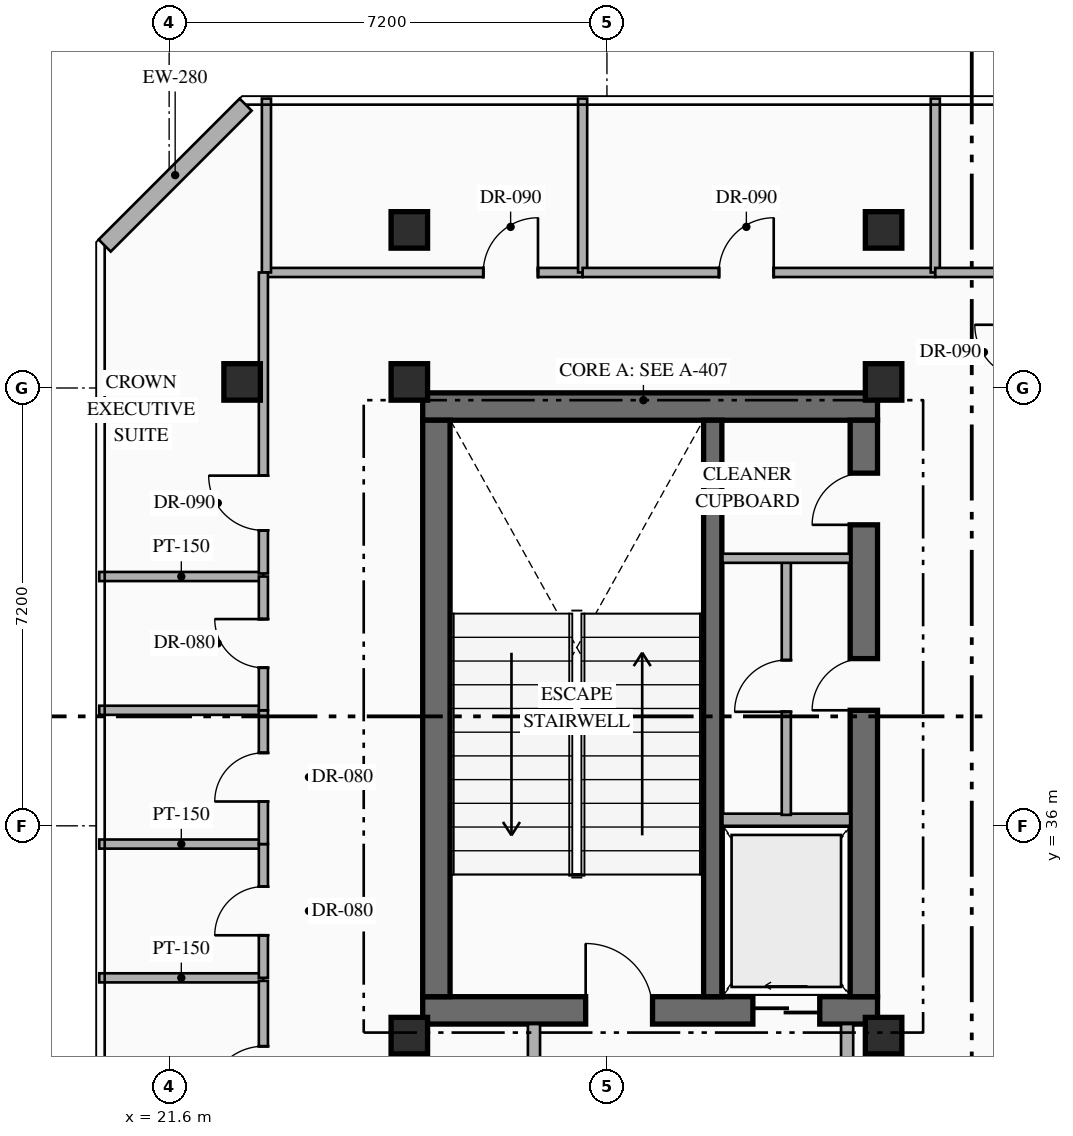
"""IFC4 building model, lengths in metres.
Left out: names, types, materials, properties, quantities, classifications, styles, units other than length and angle.
Written with IfcOpenShell. Run it as: python <this file> out.ifc"""

import sys

from ifc_helpers import new_model, si_unit, direction, frame, frame_2d, origin, origin_2d, place, context, subcontext, project, spatial, rectangle, hollow_rectangle, extrude, element, fill, save


model = new_model("IFC4")
c1 = context("Model", 3, precision=1e-05, world=origin(), true_north=direction((0.0, 1.0)))
c2 = subcontext(c1, "Body", "Model", "MODEL_VIEW")
j1 = project(units=[si_unit("LENGTHUNIT", "METRE"), si_unit("PLANEANGLEUNIT", "RADIAN")], contexts=[c1])
p1 = place(None, origin())
s1 = spatial("IfcSite", under=j1, at=p1, CompositionType="ELEMENT")
p2 = place(p1, origin())
s2 = spatial("IfcBuilding", under=s1, at=p2, CompositionType="ELEMENT")
p3 = place(p2, frame((0.0, 0.0, 277.95)))
s3 = spatial("IfcBuildingStorey", under=s2, at=p3, CompositionType="ELEMENT", Elevation=277.95)
p4 = place(p3, frame((25.77, 32.965, 0.0), z_axis=(0.0, 0.0, 1.0), x_axis=(1.0, 0.0, 0.0)))
e1 = element("IfcWall", 1, at=p4, inside=s3, PredefinedType="SHEAR", context=c2, shape_type="SweptSolid", body=[
    extrude(rectangle(XDim=7.48, YDim=0.45, at=frame_2d((3.74, 0.0))), origin(), (0.0, 0.0, 1.0), 4.0),
])
p5 = place(p4, frame((2.68, 0.0, 0.0)))
e2 = element("IfcOpeningElement", 2, at=p5, cuts=e1, PredefinedType="OPENING", context=c2, shape_type="SweptSolid", body=[
    extrude(rectangle(XDim=1.1, YDim=2.2, at=frame_2d((0.55, 1.1))), frame((0.0, 0.235, 0.0), z_axis=(0.0, -1.0, 0.0), x_axis=(1.0, 0.0, 0.0)), (0.0, 0.0, 1.0), 0.47),
])
p6 = place(p4, frame((5.43, 0.0, 0.0)))
e3 = element("IfcOpeningElement", 3, at=p6, cuts=e1, PredefinedType="OPENING", context=c2, shape_type="SweptSolid", body=[
    extrude(rectangle(XDim=1.1, YDim=2.15, at=frame_2d((0.55, 1.075))), frame((0.0, 0.235, 0.0), z_axis=(0.0, -1.0, 0.0), x_axis=(1.0, 0.0, 0.0)), (0.0, 0.0, 1.0), 0.47),
])
p7 = place(p3, frame((25.77, 42.895, 0.0), z_axis=(0.0, 0.0, 1.0), x_axis=(1.0, 0.0, 0.0)))
e4 = element("IfcWall", 4, at=p7, inside=s3, PredefinedType="SHEAR", context=c2, shape_type="SweptSolid", body=[
    extrude(rectangle(XDim=7.48, YDim=0.45, at=frame_2d((3.74, 0.0))), origin(), (0.0, 0.0, 1.0), 4.0),
])
p8 = place(p3, frame((25.995, 33.19, 0.0), z_axis=(0.0, 0.0, 1.0), x_axis=(0.0, 1.0, 0.0)))
e5 = element("IfcWall", 5, at=p8, inside=s3, PredefinedType="SHEAR", context=c2, shape_type="SweptSolid", body=[
    extrude(rectangle(XDim=9.48, YDim=0.45, at=frame_2d((4.74, 0.0))), origin(), (0.0, 0.0, 1.0), 4.0),
])
p9 = place(p3, frame((33.025, 33.19, 0.0), z_axis=(0.0, 0.0, 1.0), x_axis=(0.0, 1.0, 0.0)))
e6 = element("IfcWall", 6, at=p9, inside=s3, PredefinedType="SHEAR", context=c2, shape_type="SweptSolid", body=[
    extrude(rectangle(XDim=9.48, YDim=0.45, at=frame_2d((4.74, 0.0))), origin(), (0.0, 0.0, 1.0), 4.0),
])
p10 = place(p9, frame((4.71, 0.0, 0.0)))
e7 = element("IfcOpeningElement", 7, at=p10, cuts=e6, PredefinedType="OPENING", context=c2, shape_type="SweptSolid", body=[
    extrude(rectangle(XDim=0.85, YDim=2.08, at=frame_2d((0.425, 1.04))), frame((0.0, 0.235, 0.0), z_axis=(0.0, -1.0, 0.0), x_axis=(1.0, 0.0, 0.0)), (0.0, 0.0, 1.0), 0.47),
])
p11 = place(p9, frame((7.76, 0.0, 0.0)))
e8 = element("IfcOpeningElement", 8, at=p11, cuts=e6, PredefinedType="OPENING", context=c2, shape_type="SweptSolid", body=[
    extrude(rectangle(XDim=0.85, YDim=2.08, at=frame_2d((0.425, 1.04))), frame((0.0, 0.235, 0.0), z_axis=(0.0, -1.0, 0.0), x_axis=(1.0, 0.0, 0.0)), (0.0, 0.0, 1.0), 0.47),
])
p12 = place(p3, frame((30.54, 33.19, 0.0), z_axis=(0.0, 0.0, 1.0), x_axis=(0.0, 1.0, 0.0)))
e9 = element("IfcWall", 9, at=p12, inside=s3, PredefinedType="SHEAR", context=c2, shape_type="SweptSolid", body=[
    extrude(rectangle(XDim=9.48, YDim=0.3, at=frame_2d((4.74, 0.0))), origin(), (0.0, 0.0, 1.0), 4.0),
])
for number, where, z_axis, x_axis in (
    (10, (25.55, 32.55, 0.0), (0.0, 0.0, 1.0), (1.0, 0.0, 0.0)),
    (11, (33.35, 32.55, 0.0), (0.0, 0.0, 1.0), (1.0, 0.0, 0.0)),
    (12, (25.55, 43.3, 0.0), (0.0, 0.0, 1.0), (1.0, 0.0, 0.0)),
    (13, (33.35, 43.3, 0.0), (0.0, 0.0, 1.0), (1.0, 0.0, 0.0)),
    (14, (25.55, 45.8, 0.0), (0.0, 0.0, 1.0), (1.0, 0.0, 0.0)),
    (15, (33.35, 45.8, 0.0), (0.0, 0.0, 1.0), (1.0, 0.0, 0.0)),
    (16, (22.8, 43.3, 0.0), (0.0, 0.0, 1.0), (1.0, 0.0, 0.0)),
):
    element("IfcColumn", number, at=place(p3, frame(where, z_axis=z_axis, x_axis=x_axis)), inside=s3, PredefinedType="COLUMN", context=c2, shape_type="SweptSolid", body=[
        extrude(hollow_rectangle(XDim=0.6, YDim=0.6, WallThickness=0.025, at=origin_2d()), origin(), (0.0, 0.0, 1.0), 4.0),
    ])
p13 = place(p3, frame((20.54, 45.542, 0.0), z_axis=(0.0, 0.0, 1.0), x_axis=(0.707069542501, 0.707144017911, 0.0)))
e17 = element("IfcWall", 17, at=p13, inside=s3, PredefinedType="STANDARD", context=c2, shape_type="SweptSolid", body=[
    extrude(rectangle(XDim=3.278, YDim=0.28, at=frame_2d((1.639, 0.0))), origin(), (0.0, 0.0, 1.0), 3.74),
])
p14 = place(p3, frame((30.7, 36.1, 0.0), z_axis=(0.0, 0.0, 1.0), x_axis=(1.0, 0.0, 0.0)))
e18 = element("IfcWall", 18, at=p14, inside=s3, PredefinedType="STANDARD", context=c2, shape_type="SweptSolid", body=[
    extrude(rectangle(XDim=2.1, YDim=0.2, at=frame_2d((1.05, 0.0))), origin(), (0.0, 0.0, 1.0), 3.74),
])
p15 = place(p3, frame((31.75, 36.18, 0.0), z_axis=(0.0, 0.0, 1.0), x_axis=(0.0, 1.0, 0.0)))
e19 = element("IfcWall", 19, at=p15, inside=s3, PredefinedType="PARTITIONING", context=c2, shape_type="SweptSolid", body=[
    extrude(rectangle(XDim=4.24, YDim=0.15, at=frame_2d((2.12, 0.0))), origin(), (0.0, 0.0, 1.0), 3.74),
])
p16 = place(p15, frame((1.695, 0.0, 0.0)))
e20 = element("IfcOpeningElement", 20, at=p16, cuts=e19, PredefinedType="OPENING", context=c2, shape_type="SweptSolid", body=[
    extrude(rectangle(XDim=0.85, YDim=2.08, at=frame_2d((0.425, 1.04))), frame((0.0, 0.085, 0.0), z_axis=(0.0, -1.0, 0.0), x_axis=(1.0, 0.0, 0.0)), (0.0, 0.0, 1.0), 0.17),
])
p17 = place(p3, frame((30.7, 40.4, 0.0), z_axis=(0.0, 0.0, 1.0), x_axis=(1.0, 0.0, 0.0)))
e21 = element("IfcWall", 21, at=p17, inside=s3, PredefinedType="PARTITIONING", context=c2, shape_type="SweptSolid", body=[
    extrude(rectangle(XDim=2.1, YDim=0.15, at=frame_2d((1.05, 0.0))), origin(), (0.0, 0.0, 1.0), 3.74),
])
p18 = place(p3, frame((27.6, 29.2, 0.0), z_axis=(0.0, 0.0, 1.0), x_axis=(0.0, 1.0, 0.0)))
e22 = element("IfcWall", 22, at=p18, inside=s3, PredefinedType="STANDARD", context=c2, shape_type="SweptSolid", body=[
    extrude(rectangle(XDim=3.54, YDim=0.2, at=frame_2d((1.77, 0.0))), origin(), (0.0, 0.0, 1.0), 3.74),
])
p19 = place(p3, frame((32.75, 29.2, 0.0), z_axis=(0.0, 0.0, 1.0), x_axis=(0.0, 1.0, 0.0)))
e23 = element("IfcWall", 23, at=p19, inside=s3, PredefinedType="STANDARD", context=c2, shape_type="SweptSolid", body=[
    extrude(rectangle(XDim=3.54, YDim=0.2, at=frame_2d((1.77, 0.0))), origin(), (0.0, 0.0, 1.0), 3.74),
])
p20 = place(p19, frame((1.45, 0.0, 0.0)))
e24 = element("IfcOpeningElement", 24, at=p20, cuts=e23, PredefinedType="OPENING", context=c2, shape_type="SweptSolid", body=[
    extrude(rectangle(XDim=1.0, YDim=2.2, at=frame_2d((0.5, 1.1))), frame((0.0, 0.11, 0.0), z_axis=(0.0, -1.0, 0.0), x_axis=(1.0, 0.0, 0.0)), (0.0, 0.0, 1.0), 0.22),
])
for number, where, z_axis, x_axis in (
    (25, (20.45, 33.5, 0.0), (0.0, 0.0, 1.0), (1.0, 0.0, 0.0)),
    (26, (20.45, 40.1, 0.0), (0.0, 0.0, 1.0), (1.0, 0.0, 0.0)),
    (27, (20.45, 35.7, 0.0), (0.0, 0.0, 1.0), (1.0, 0.0, 0.0)),
    (28, (20.45, 37.9, 0.0), (0.0, 0.0, 1.0), (1.0, 0.0, 0.0)),
):
    element("IfcWall", number, at=place(p3, frame(where, z_axis=z_axis, x_axis=x_axis)), inside=s3, PredefinedType="PARTITIONING", context=c2, shape_type="SweptSolid", body=[
        extrude(rectangle(XDim=2.7, YDim=0.15, at=frame_2d((1.35, 0.0))), origin(), (0.0, 0.0, 1.0), 3.74),
    ])
p21 = place(p3, frame((23.15, 33.5, 0.0), z_axis=(0.0, 0.0, 1.0), x_axis=(0.0, 1.0, 0.0)))
e29 = element("IfcWall", 29, at=p21, inside=s3, PredefinedType="PARTITIONING", context=c2, shape_type="SweptSolid", body=[
    extrude(rectangle(XDim=2.2, YDim=0.15, at=frame_2d((1.1, 0.0))), origin(), (0.0, 0.0, 1.0), 3.74),
])
p22 = place(p21, frame((0.7, 0.0, 0.0)))
e30 = element("IfcOpeningElement", 30, at=p22, cuts=e29, PredefinedType="OPENING", context=c2, shape_type="SweptSolid", body=[
    extrude(rectangle(XDim=0.8, YDim=2.06, at=frame_2d((0.4, 1.03))), frame((0.0, 0.085, 0.0), z_axis=(0.0, -1.0, 0.0), x_axis=(1.0, 0.0, 0.0)), (0.0, 0.0, 1.0), 0.17),
])
p23 = place(p3, frame((23.15, 35.7, 0.0), z_axis=(0.0, 0.0, 1.0), x_axis=(0.0, 1.0, 0.0)))
e31 = element("IfcWall", 31, at=p23, inside=s3, PredefinedType="PARTITIONING", context=c2, shape_type="SweptSolid", body=[
    extrude(rectangle(XDim=2.2, YDim=0.15, at=frame_2d((1.1, 0.0))), origin(), (0.0, 0.0, 1.0), 3.74),
])
p24 = place(p23, frame((0.7, 0.0, 0.0)))
e32 = element("IfcOpeningElement", 32, at=p24, cuts=e31, PredefinedType="OPENING", context=c2, shape_type="SweptSolid", body=[
    extrude(rectangle(XDim=0.8, YDim=2.06, at=frame_2d((0.4, 1.03))), frame((0.0, 0.085, 0.0), z_axis=(0.0, -1.0, 0.0), x_axis=(1.0, 0.0, 0.0)), (0.0, 0.0, 1.0), 0.17),
])
p25 = place(p3, frame((23.15, 37.9, 0.0), z_axis=(0.0, 0.0, 1.0), x_axis=(0.0, 1.0, 0.0)))
e33 = element("IfcWall", 33, at=p25, inside=s3, PredefinedType="PARTITIONING", context=c2, shape_type="SweptSolid", body=[
    extrude(rectangle(XDim=2.2, YDim=0.15, at=frame_2d((1.1, 0.0))), origin(), (0.0, 0.0, 1.0), 3.74),
])
p26 = place(p25, frame((0.7, 0.0, 0.0)))
e34 = element("IfcOpeningElement", 34, at=p26, cuts=e33, PredefinedType="OPENING", context=c2, shape_type="SweptSolid", body=[
    extrude(rectangle(XDim=0.8, YDim=2.06, at=frame_2d((0.4, 1.03))), frame((0.0, 0.085, 0.0), z_axis=(0.0, -1.0, 0.0), x_axis=(1.0, 0.0, 0.0)), (0.0, 0.0, 1.0), 0.17),
])
p27 = place(p3, frame((23.2, 45.1, 0.0), z_axis=(0.0, 0.0, 1.0), x_axis=(1.0, 0.0, 0.0)))
e35 = element("IfcWall", 35, at=p27, inside=s3, PredefinedType="PARTITIONING", context=c2, shape_type="SweptSolid", body=[
    extrude(rectangle(XDim=5.2, YDim=0.15, at=frame_2d((2.6, 0.0))), origin(), (0.0, 0.0, 1.0), 3.74),
])
p28 = place(p27, frame((3.566, 0.0, 0.0)))
e36 = element("IfcOpeningElement", 36, at=p28, cuts=e35, PredefinedType="OPENING", context=c2, shape_type="SweptSolid", body=[
    extrude(rectangle(XDim=0.9, YDim=2.15, at=frame_2d((0.45, 1.075))), frame((0.0, 0.085, 0.0), z_axis=(0.0, -1.0, 0.0), x_axis=(1.0, 0.0, 0.0)), (0.0, 0.0, 1.0), 0.17),
])
for number, where, z_axis, x_axis in (
    (37, (23.2, 45.1, 0.0), (0.0, 0.0, 1.0), (0.0, 1.0, 0.0)),
    (38, (28.4, 45.1, 0.0), (0.0, 0.0, 1.0), (0.0, 1.0, 0.0)),
):
    element("IfcWall", number, at=place(p3, frame(where, z_axis=z_axis, x_axis=x_axis)), inside=s3, PredefinedType="PARTITIONING", context=c2, shape_type="SweptSolid", body=[
        extrude(rectangle(XDim=2.86, YDim=0.15, at=frame_2d((1.43, 0.0))), origin(), (0.0, 0.0, 1.0), 3.74),
    ])
p29 = place(p3, frame((28.4, 45.1, 0.0), z_axis=(0.0, 0.0, 1.0), x_axis=(1.0, 0.0, 0.0)))
e39 = element("IfcWall", 39, at=p29, inside=s3, PredefinedType="PARTITIONING", context=c2, shape_type="SweptSolid", body=[
    extrude(rectangle(XDim=5.8, YDim=0.15, at=frame_2d((2.9, 0.0))), origin(), (0.0, 0.0, 1.0), 3.74),
])
p30 = place(p29, frame((2.243, 0.0, 0.0)))
e40 = element("IfcOpeningElement", 40, at=p30, cuts=e39, PredefinedType="OPENING", context=c2, shape_type="SweptSolid", body=[
    extrude(rectangle(XDim=0.9, YDim=2.15, at=frame_2d((0.45, 1.075))), frame((0.0, 0.085, 0.0), z_axis=(0.0, -1.0, 0.0), x_axis=(1.0, 0.0, 0.0)), (0.0, 0.0, 1.0), 0.17),
])
p31 = place(p3, frame((34.2, 45.1, 0.0), z_axis=(0.0, 0.0, 1.0), x_axis=(0.0, 1.0, 0.0)))
e41 = element("IfcWall", 41, at=p31, inside=s3, PredefinedType="PARTITIONING", context=c2, shape_type="SweptSolid", body=[
    extrude(rectangle(XDim=2.86, YDim=0.15, at=frame_2d((1.43, 0.0))), origin(), (0.0, 0.0, 1.0), 3.74),
])
p32 = place(p3, frame((34.2, 45.1, 0.0), z_axis=(0.0, 0.0, 1.0), x_axis=(1.0, 0.0, 0.0)))
e42 = element("IfcWall", 42, at=p32, inside=s3, PredefinedType="PARTITIONING", context=c2, shape_type="SweptSolid", body=[
    extrude(rectangle(XDim=5.6, YDim=0.15, at=frame_2d((2.8, 0.0))), origin(), (0.0, 0.0, 1.0), 3.74),
])
p33 = place(p32, frame((2.35, 0.0, 0.0)))
e43 = element("IfcOpeningElement", 43, at=p33, cuts=e42, PredefinedType="OPENING", context=c2, shape_type="SweptSolid", body=[
    extrude(rectangle(XDim=0.9, YDim=2.15, at=frame_2d((0.45, 1.075))), frame((0.0, 0.085, 0.0), z_axis=(0.0, -1.0, 0.0), x_axis=(1.0, 0.0, 0.0)), (0.0, 0.0, 1.0), 0.17),
])
p34 = place(p3, frame((23.15, 30.4, 0.0), z_axis=(0.0, 0.0, 1.0), x_axis=(0.0, 1.0, 0.0)))
e44 = element("IfcWall", 44, at=p34, inside=s3, PredefinedType="PARTITIONING", context=c2, shape_type="SweptSolid", body=[
    extrude(rectangle(XDim=3.05, YDim=0.15, at=frame_2d((1.525, 0.0))), origin(), (0.0, 0.0, 1.0), 3.74),
])
p35 = place(p34, frame((1.075, 0.0, 0.0)))
e45 = element("IfcOpeningElement", 45, at=p35, cuts=e44, PredefinedType="OPENING", context=c2, shape_type="SweptSolid", body=[
    extrude(rectangle(XDim=0.9, YDim=2.15, at=frame_2d((0.45, 1.075))), frame((0.0, 0.085, 0.0), z_axis=(0.0, -1.0, 0.0), x_axis=(1.0, 0.0, 0.0)), (0.0, 0.0, 1.0), 0.17),
])
p36 = place(p3, frame((23.15, 40.15, 0.0), z_axis=(0.0, 0.0, 1.0), x_axis=(0.0, 1.0, 0.0)))
e46 = element("IfcWall", 46, at=p36, inside=s3, PredefinedType="PARTITIONING", context=c2, shape_type="SweptSolid", body=[
    extrude(rectangle(XDim=4.95, YDim=0.15, at=frame_2d((2.475, 0.0))), origin(), (0.0, 0.0, 1.0), 3.74),
])
p37 = place(p36, frame((0.709, 0.0, 0.0)))
e47 = element("IfcOpeningElement", 47, at=p37, cuts=e46, PredefinedType="OPENING", context=c2, shape_type="SweptSolid", body=[
    extrude(rectangle(XDim=0.9, YDim=2.15, at=frame_2d((0.45, 1.075))), frame((0.0, 0.085, 0.0), z_axis=(0.0, -1.0, 0.0), x_axis=(1.0, 0.0, 0.0)), (0.0, 0.0, 1.0), 0.17),
])
p38 = place(p5, origin())
e48 = element("IfcDoor", 48, at=p38, inside=s3, OperationType="SINGLE_SWING_LEFT", PredefinedType="DOOR", context=c2, shape_type="SweptSolid", body=[
    extrude(rectangle(XDim=1.1, YDim=2.2, at=frame_2d((0.55, 1.1))), frame((0.0, 0.025, 0.0), z_axis=(0.0, -1.0, 0.0), x_axis=(1.0, 0.0, 0.0)), (0.0, 0.0, 1.0), 0.05),
])
fill(e2, e48)
p39 = place(p6, origin())
e49 = element("IfcDoor", 49, at=p39, inside=s3, OperationType="SLIDING_TO_LEFT", PredefinedType="USERDEFINED", context=c2, shape_type="SweptSolid", body=[
    extrude(rectangle(XDim=1.1, YDim=2.15, at=frame_2d((0.55, 1.075))), frame((0.0, 0.025, 0.0), z_axis=(0.0, -1.0, 0.0), x_axis=(1.0, 0.0, 0.0)), (0.0, 0.0, 1.0), 0.05),
])
fill(e3, e49)
p40 = place(p10, origin())
e50 = element("IfcDoor", 50, at=p40, inside=s3, OperationType="SINGLE_SWING_LEFT", PredefinedType="DOOR", context=c2, shape_type="SweptSolid", body=[
    extrude(rectangle(XDim=0.85, YDim=2.08, at=frame_2d((0.425, 1.04))), frame((0.0, 0.025, 0.0), z_axis=(0.0, -1.0, 0.0), x_axis=(1.0, 0.0, 0.0)), (0.0, 0.0, 1.0), 0.05),
])
fill(e7, e50)
p41 = place(p11, origin())
e51 = element("IfcDoor", 51, at=p41, inside=s3, OperationType="SINGLE_SWING_LEFT", PredefinedType="DOOR", context=c2, shape_type="SweptSolid", body=[
    extrude(rectangle(XDim=0.85, YDim=2.08, at=frame_2d((0.425, 1.04))), frame((0.0, 0.025, 0.0), z_axis=(0.0, -1.0, 0.0), x_axis=(1.0, 0.0, 0.0)), (0.0, 0.0, 1.0), 0.05),
])
fill(e8, e51)
p42 = place(p16, origin())
e52 = element("IfcDoor", 52, at=p42, inside=s3, OperationType="SINGLE_SWING_LEFT", PredefinedType="DOOR", context=c2, shape_type="SweptSolid", body=[
    extrude(rectangle(XDim=0.85, YDim=2.08, at=frame_2d((0.425, 1.04))), frame((0.0, 0.025, 0.0), z_axis=(0.0, -1.0, 0.0), x_axis=(1.0, 0.0, 0.0)), (0.0, 0.0, 1.0), 0.05),
])
fill(e20, e52)
p43 = place(p22, origin())
e53 = element("IfcDoor", 53, at=p43, inside=s3, OperationType="SINGLE_SWING_LEFT", PredefinedType="DOOR", context=c2, shape_type="SweptSolid", body=[
    extrude(rectangle(XDim=0.8, YDim=2.06, at=frame_2d((0.4, 1.03))), frame((0.0, 0.025, 0.0), z_axis=(0.0, -1.0, 0.0), x_axis=(1.0, 0.0, 0.0)), (0.0, 0.0, 1.0), 0.05),
])
fill(e30, e53)
p44 = place(p24, origin())
e54 = element("IfcDoor", 54, at=p44, inside=s3, OperationType="SINGLE_SWING_LEFT", PredefinedType="DOOR", context=c2, shape_type="SweptSolid", body=[
    extrude(rectangle(XDim=0.8, YDim=2.06, at=frame_2d((0.4, 1.03))), frame((0.0, 0.025, 0.0), z_axis=(0.0, -1.0, 0.0), x_axis=(1.0, 0.0, 0.0)), (0.0, 0.0, 1.0), 0.05),
])
fill(e32, e54)
p45 = place(p26, origin())
e55 = element("IfcDoor", 55, at=p45, inside=s3, OperationType="SINGLE_SWING_RIGHT", PredefinedType="DOOR", context=c2, shape_type="SweptSolid", body=[
    extrude(rectangle(XDim=0.8, YDim=2.06, at=frame_2d((0.4, 1.03))), frame((0.0, 0.025, 0.0), z_axis=(0.0, -1.0, 0.0), x_axis=(1.0, 0.0, 0.0)), (0.0, 0.0, 1.0), 0.05),
])
fill(e34, e55)
p46 = place(p28, origin())
e56 = element("IfcDoor", 56, at=p46, inside=s3, OperationType="SINGLE_SWING_RIGHT", PredefinedType="DOOR", context=c2, shape_type="SweptSolid", body=[
    extrude(rectangle(XDim=0.9, YDim=2.15, at=frame_2d((0.45, 1.075))), frame((0.0, 0.025, 0.0), z_axis=(0.0, -1.0, 0.0), x_axis=(1.0, 0.0, 0.0)), (0.0, 0.0, 1.0), 0.05),
])
fill(e36, e56)
p47 = place(p30, origin())
e57 = element("IfcDoor", 57, at=p47, inside=s3, OperationType="SINGLE_SWING_RIGHT", PredefinedType="DOOR", context=c2, shape_type="SweptSolid", body=[
    extrude(rectangle(XDim=0.9, YDim=2.15, at=frame_2d((0.45, 1.075))), frame((0.0, 0.025, 0.0), z_axis=(0.0, -1.0, 0.0), x_axis=(1.0, 0.0, 0.0)), (0.0, 0.0, 1.0), 0.05),
])
fill(e40, e57)
p48 = place(p35, origin())
e58 = element("IfcDoor", 58, at=p48, inside=s3, OperationType="SINGLE_SWING_LEFT", PredefinedType="DOOR", context=c2, shape_type="SweptSolid", body=[
    extrude(rectangle(XDim=0.9, YDim=2.15, at=frame_2d((0.45, 1.075))), frame((0.0, 0.025, 0.0), z_axis=(0.0, -1.0, 0.0), x_axis=(1.0, 0.0, 0.0)), (0.0, 0.0, 1.0), 0.05),
])
fill(e45, e58)
p49 = place(p37, origin())
e59 = element("IfcDoor", 59, at=p49, inside=s3, OperationType="SINGLE_SWING_RIGHT", PredefinedType="DOOR", context=c2, shape_type="SweptSolid", body=[
    extrude(rectangle(XDim=0.9, YDim=2.15, at=frame_2d((0.45, 1.075))), frame((0.0, 0.025, 0.0), z_axis=(0.0, -1.0, 0.0), x_axis=(1.0, 0.0, 0.0)), (0.0, 0.0, 1.0), 0.05),
])
fill(e47, e59)
save(model, sys.argv[1])
